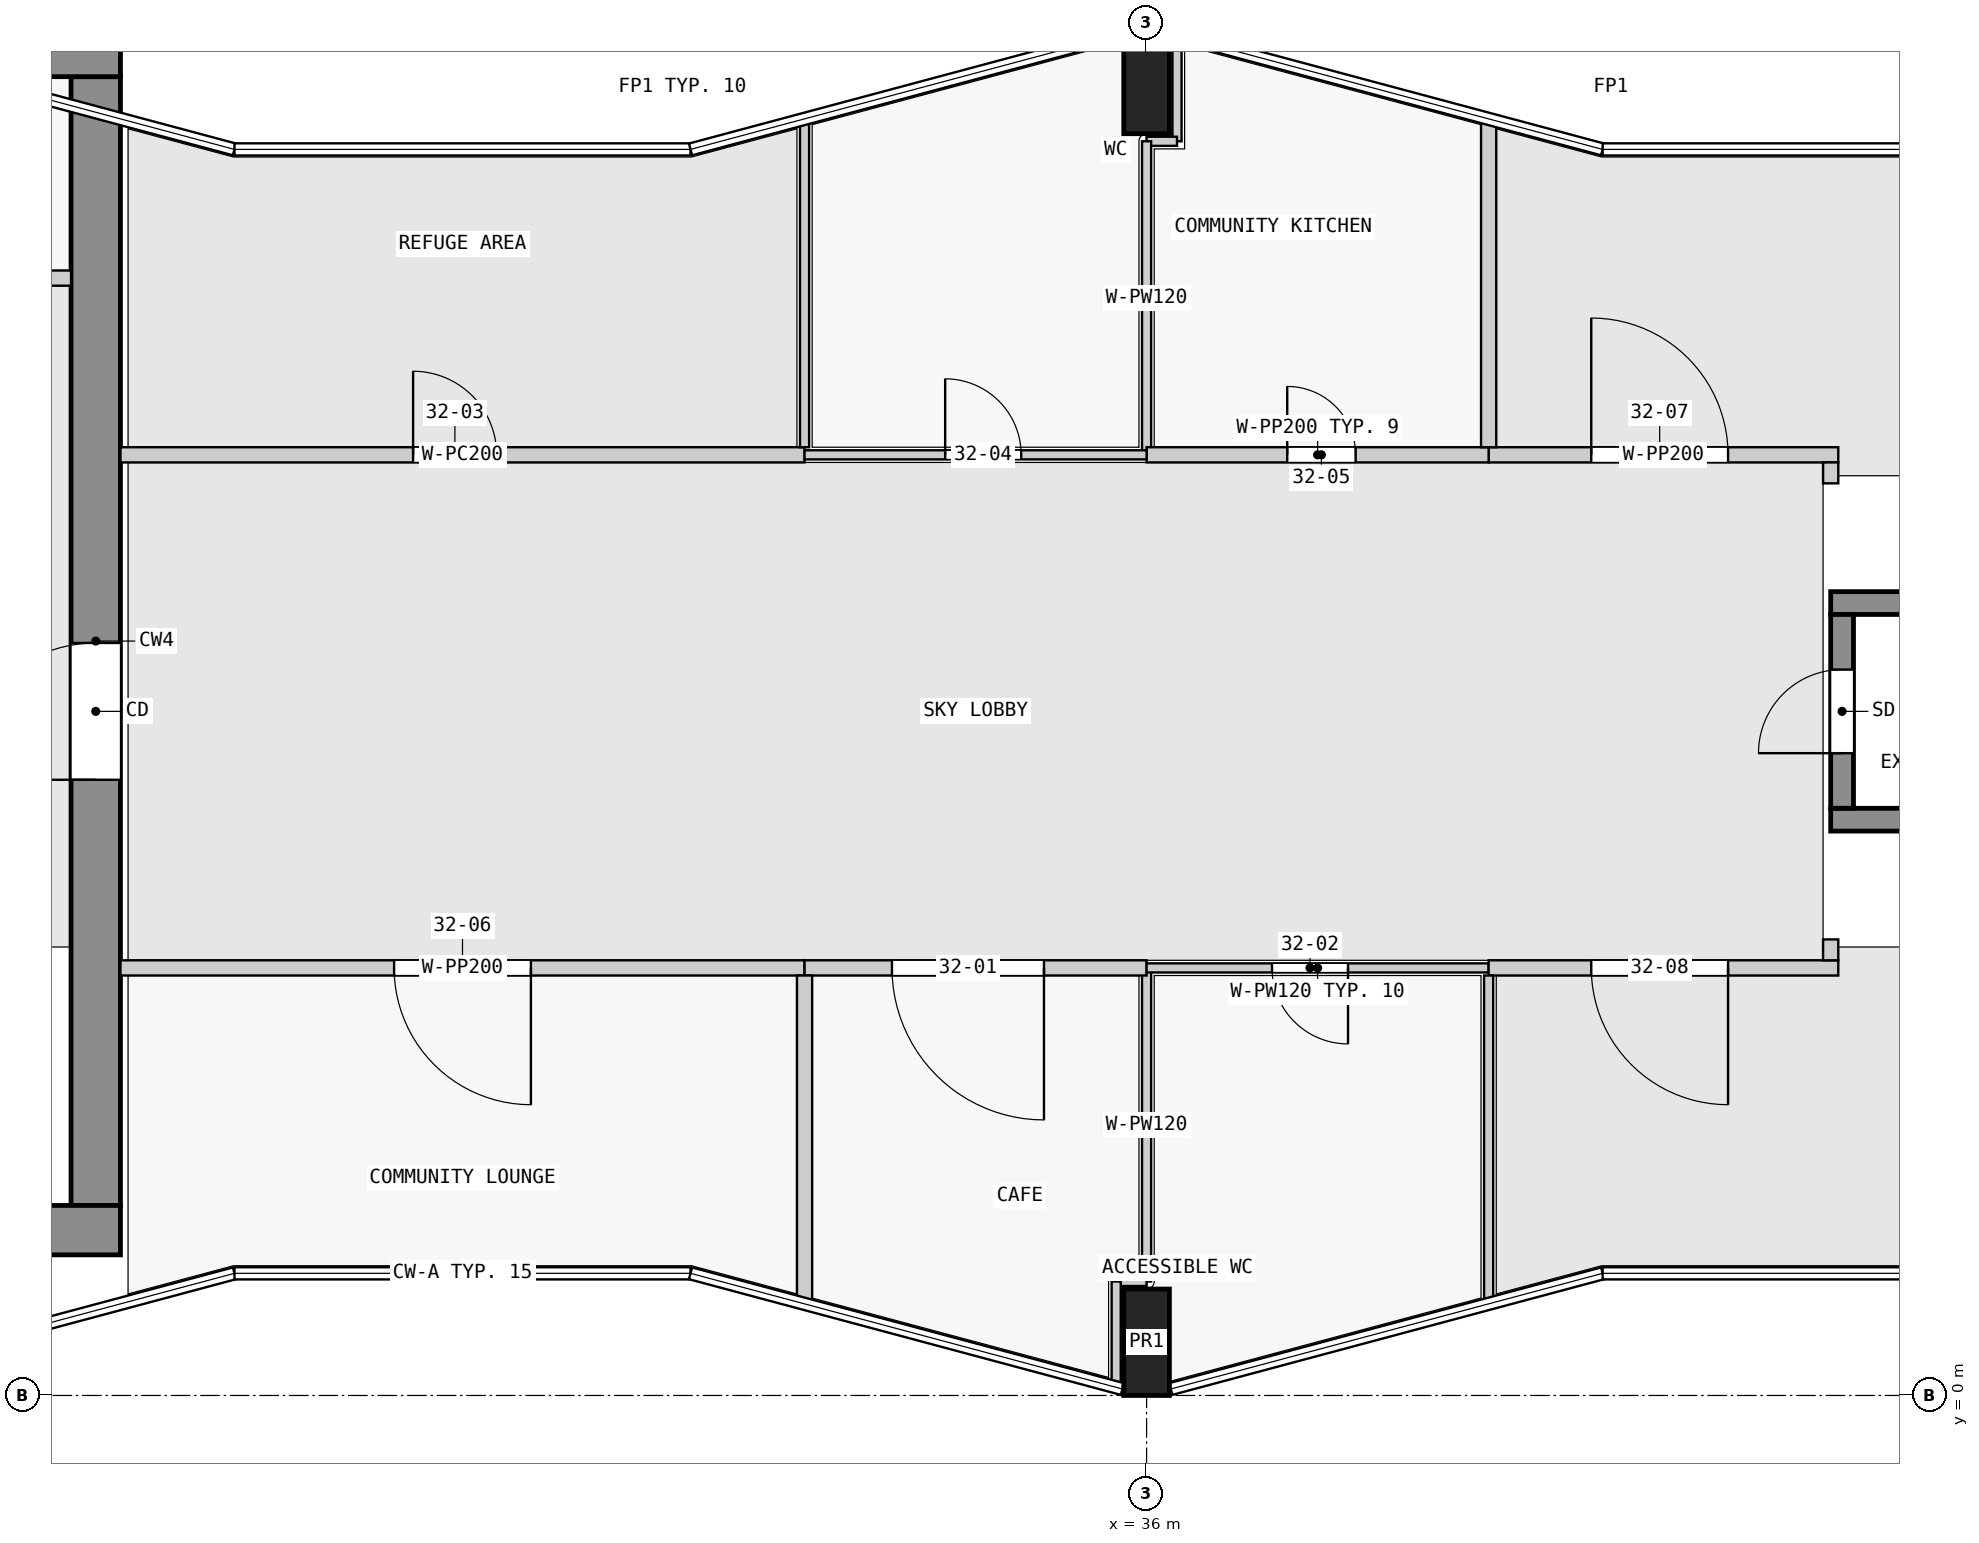
"""IFC4 building model, lengths in metres.
Left out: names, types, materials, properties, quantities, classifications, styles, units other than length and angle.
Written with IfcOpenShell. Run it as: python <this file> out.ifc"""

import sys

from ifc_helpers import new_model, si_unit, direction, frame, frame_2d, origin, origin_2d, place, context, subcontext, project, spatial, rectangle, extrude, element, fill, save


model = new_model("IFC4")
c1 = context("Model", 3, precision=1e-05, world=origin(), true_north=direction((0.0, 1.0)))
c2 = subcontext(c1, "Body", "Model", "MODEL_VIEW")
j1 = project(units=[si_unit("LENGTHUNIT", "METRE"), si_unit("PLANEANGLEUNIT", "RADIAN")], contexts=[c1])
p1 = place(None, origin())
s1 = spatial("IfcSite", under=j1, at=p1, CompositionType="ELEMENT")
p2 = place(p1, origin())
s2 = spatial("IfcBuilding", under=s1, at=p2, CompositionType="ELEMENT")
p3 = place(p2, frame((0.0, 0.0, 123.8)))
s3 = spatial("IfcBuildingStorey", under=s2, at=p3, CompositionType="ELEMENT", Elevation=123.8)
for number, where, z_axis, x_axis in (
    (1, (36.0, 0.7, 0.0), (0.0, 0.0, 1.0), (1.0, 0.0, 0.0)),
    (2, (36.0, 17.3, 0.0), (0.0, 0.0, 1.0), (1.0, 0.0, 0.0)),
):
    element("IfcColumn", number, at=place(p3, frame(where, z_axis=z_axis, x_axis=x_axis)), inside=s3, PredefinedType="COLUMN", context=c2, shape_type="SweptSolid", body=[
        extrude(rectangle(XDim=0.6, YDim=1.4, at=origin_2d()), origin(), (0.0, 0.0, 1.0), 4.8),
    ])
p4 = place(p3, frame((1.65, 2.175, 0.0), z_axis=(0.0, 0.0, 1.0), x_axis=(1.0, 0.0, 0.0)))
e3 = element("IfcWall", 3, at=p4, inside=s3, PredefinedType="SHEAR", context=c2, shape_type="SweptSolid", body=[
    extrude(rectangle(XDim=20.85, YDim=0.65, at=frame_2d((10.425, 0.0))), origin(), (0.0, 0.0, 1.0), 4.5),
])
p5 = place(p3, frame((1.65, 17.675, 0.0), z_axis=(0.0, 0.0, 1.0), x_axis=(1.0, 0.0, 0.0)))
e4 = element("IfcWall", 4, at=p5, inside=s3, PredefinedType="SHEAR", context=c2, shape_type="SweptSolid", body=[
    extrude(rectangle(XDim=20.85, YDim=0.65, at=frame_2d((10.425, 0.0))), origin(), (0.0, 0.0, 1.0), 4.5),
])
p6 = place(p5, frame((6.45, 0.0, 0.0)))
e5 = element("IfcOpeningElement", 5, at=p6, cuts=e4, PredefinedType="OPENING", context=c2, shape_type="SweptSolid", body=[
    extrude(rectangle(XDim=1.8, YDim=2.1, at=frame_2d((0.9, 1.05))), frame((0.0, 0.335, 0.0), z_axis=(0.0, -1.0, 0.0), x_axis=(1.0, 0.0, 0.0)), (0.0, 0.0, 1.0), 0.67),
])
p7 = place(p3, frame((22.175, 2.5, 0.0), z_axis=(0.0, 0.0, 1.0), x_axis=(0.0, 1.0, 0.0)))
e6 = element("IfcWall", 6, at=p7, inside=s3, PredefinedType="SHEAR", context=c2, shape_type="SweptSolid", body=[
    extrude(rectangle(XDim=14.85, YDim=0.65, at=frame_2d((7.425, 0.0))), origin(), (0.0, 0.0, 1.0), 4.5),
])
p8 = place(p7, frame((5.6, 0.0, 0.0)))
e7 = element("IfcOpeningElement", 7, at=p8, cuts=e6, PredefinedType="OPENING", context=c2, shape_type="SweptSolid", body=[
    extrude(rectangle(XDim=1.8, YDim=2.1, at=frame_2d((0.9, 1.05))), frame((0.0, 0.335, 0.0), z_axis=(0.0, -1.0, 0.0), x_axis=(1.0, 0.0, 0.0)), (0.0, 0.0, 1.0), 0.67),
])
p9 = place(p3, frame((45.15, 7.725, 0.0), z_axis=(0.0, 0.0, 1.0), x_axis=(0.0, 1.0, 0.0)))
e8 = element("IfcWall", 8, at=p9, inside=s3, PredefinedType="SHEAR", context=c2, shape_type="SweptSolid", body=[
    extrude(rectangle(XDim=2.55, YDim=0.3, at=frame_2d((1.275, 0.0))), origin(), (0.0, 0.0, 1.0), 4.8),
])
p10 = place(p9, frame((0.725, 0.0, 0.0)))
e9 = element("IfcOpeningElement", 9, at=p10, cuts=e8, PredefinedType="OPENING", context=c2, shape_type="SweptSolid", body=[
    extrude(rectangle(XDim=1.1, YDim=2.1, at=frame_2d((0.55, 1.05))), frame((0.0, 0.16, 0.0), z_axis=(0.0, -1.0, 0.0), x_axis=(1.0, 0.0, 0.0)), (0.0, 0.0, 1.0), 0.32),
])
for number, where, z_axis, x_axis in (
    (10, (45.0, 7.575, 0.0), (0.0, 0.0, 1.0), (1.0, 0.0, 0.0)),
    (11, (45.0, 10.425, 0.0), (0.0, 0.0, 1.0), (1.0, 0.0, 0.0)),
):
    element("IfcWall", number, at=place(p3, frame(where, z_axis=z_axis, x_axis=x_axis)), inside=s3, PredefinedType="SHEAR", context=c2, shape_type="SweptSolid", body=[
        extrude(rectangle(XDim=7.2, YDim=0.3, at=frame_2d((3.6, 0.0))), origin(), (0.0, 0.0, 1.0), 4.8),
    ])
p11 = place(p3, frame((18.6, 14.7, 0.0), z_axis=(0.0, 0.0, 1.0), x_axis=(1.0, 0.0, 0.0)))
e12 = element("IfcWall", 12, at=p11, inside=s3, PredefinedType="PARTITIONING", context=c2, shape_type="SweptSolid", body=[
    extrude(rectangle(XDim=3.25, YDim=0.2, at=frame_2d((1.625, 0.0))), origin(), (0.0, 0.0, 1.0), 4.5),
])
p12 = place(p11, frame((0.3, 0.0, 0.0)))
e13 = element("IfcOpeningElement", 13, at=p12, cuts=e12, PredefinedType="OPENING", context=c2, shape_type="SweptSolid", body=[
    extrude(rectangle(XDim=0.9, YDim=2.1, at=frame_2d((0.45, 1.05))), frame((0.0, 0.11, 0.0), z_axis=(0.0, -1.0, 0.0), x_axis=(1.0, 0.0, 0.0)), (0.0, 0.0, 1.0), 0.22),
])
p13 = place(p11, frame((1.925, 0.0, 0.0)))
e14 = element("IfcOpeningElement", 14, at=p13, cuts=e12, PredefinedType="OPENING", context=c2, shape_type="SweptSolid", body=[
    extrude(rectangle(XDim=0.9, YDim=2.1, at=frame_2d((0.45, 1.05))), frame((0.0, 0.11, 0.0), z_axis=(0.0, -1.0, 0.0), x_axis=(1.0, 0.0, 0.0)), (0.0, 0.0, 1.0), 0.22),
])
p14 = place(p3, frame((22.5, 12.375, 0.0), z_axis=(0.0, 0.0, 1.0), x_axis=(1.0, 0.0, 0.0)))
e15 = element("IfcWall", 15, at=p14, inside=s3, PredefinedType="PARTITIONING", context=c2, shape_type="SweptSolid", body=[
    extrude(rectangle(XDim=9.0, YDim=0.2, at=frame_2d((4.5, 0.0))), origin(), (0.0, 0.0, 1.0), 4.5),
])
p15 = place(p14, frame((3.85, 0.0, 0.0)))
e16 = element("IfcOpeningElement", 16, at=p15, cuts=e15, PredefinedType="OPENING", context=c2, shape_type="SweptSolid", body=[
    extrude(rectangle(XDim=1.1, YDim=2.1, at=frame_2d((0.55, 1.05))), frame((0.0, 0.11, 0.0), z_axis=(0.0, -1.0, 0.0), x_axis=(1.0, 0.0, 0.0)), (0.0, 0.0, 1.0), 0.22),
])
p16 = place(p3, frame((31.5, 5.625, 0.0), z_axis=(0.0, 0.0, 1.0), x_axis=(-1.0, 0.0, 0.0)))
e17 = element("IfcWall", 17, at=p16, inside=s3, PredefinedType="PARTITIONING", context=c2, shape_type="SweptSolid", body=[
    extrude(rectangle(XDim=9.0, YDim=0.2, at=frame_2d((4.5, 0.0))), origin(), (0.0, 0.0, 1.0), 4.5),
])
p17 = place(p16, frame((3.6, 0.0, 0.0)))
e18 = element("IfcOpeningElement", 18, at=p17, cuts=e17, PredefinedType="OPENING", context=c2, shape_type="SweptSolid", body=[
    extrude(rectangle(XDim=1.8, YDim=2.1, at=frame_2d((0.9, 1.05))), frame((0.0, 0.11, 0.0), z_axis=(0.0, -1.0, 0.0), x_axis=(1.0, 0.0, 0.0)), (0.0, 0.0, 1.0), 0.22),
])
p18 = place(p3, frame((36.0, 5.625, 0.0), z_axis=(0.0, 0.0, 1.0), x_axis=(0.0, -1.0, 0.0)))
e19 = element("IfcWall", 19, at=p18, inside=s3, PredefinedType="PARTITIONING", context=c2, shape_type="SweptSolid", body=[
    extrude(rectangle(XDim=4.125, YDim=0.12, at=frame_2d((2.062, 0.0))), origin(), (0.0, 0.0, 1.0), 4.5),
])
p19 = place(p3, frame((36.0, 1.5, 0.0), z_axis=(0.0, 0.0, 1.0), x_axis=(-1.0, 0.0, 0.0)))
e20 = element("IfcWall", 20, at=p19, inside=s3, PredefinedType="PARTITIONING", context=c2, shape_type="SweptSolid", body=[
    extrude(rectangle(XDim=0.4, YDim=0.12, at=frame_2d((0.2, 0.0))), origin(), (0.0, 0.0, 1.0), 4.5),
])
for number, where, z_axis, x_axis in (
    (21, (35.6, 1.5, 0.0), (0.0, 0.0, 1.0), (0.0, -1.0, 0.0)),
    (22, (36.4, 17.893, 0.0), (0.0, 0.0, 1.0), (0.0, -1.0, 0.0)),
):
    element("IfcWall", number, at=place(p3, frame(where, z_axis=z_axis, x_axis=x_axis)), inside=s3, PredefinedType="PARTITIONING", context=c2, shape_type="SweptSolid", body=[
        extrude(rectangle(XDim=1.393, YDim=0.12, at=frame_2d((0.697, 0.0))), origin(), (0.0, 0.0, 1.0), 4.5),
    ])
p20 = place(p3, frame((36.4, 16.5, 0.0), z_axis=(0.0, 0.0, 1.0), x_axis=(-1.0, 0.0, 0.0)))
e23 = element("IfcWall", 23, at=p20, inside=s3, PredefinedType="PARTITIONING", context=c2, shape_type="SweptSolid", body=[
    extrude(rectangle(XDim=0.4, YDim=0.12, at=frame_2d((0.2, 0.0))), origin(), (0.0, 0.0, 1.0), 4.5),
])
p21 = place(p3, frame((36.0, 16.5, 0.0), z_axis=(0.0, 0.0, 1.0), x_axis=(0.0, -1.0, 0.0)))
e24 = element("IfcWall", 24, at=p21, inside=s3, PredefinedType="PARTITIONING", context=c2, shape_type="SweptSolid", body=[
    extrude(rectangle(XDim=4.125, YDim=0.12, at=frame_2d((2.062, 0.0))), origin(), (0.0, 0.0, 1.0), 4.5),
])
p22 = place(p3, frame((40.5, 12.375, 0.0), z_axis=(0.0, 0.0, 1.0), x_axis=(1.0, 0.0, 0.0)))
e25 = element("IfcWall", 25, at=p22, inside=s3, PredefinedType="PARTITIONING", context=c2, shape_type="SweptSolid", body=[
    extrude(rectangle(XDim=4.6, YDim=0.2, at=frame_2d((2.3, 0.0))), origin(), (0.0, 0.0, 1.0), 4.5),
])
p23 = place(p22, frame((1.35, 0.0, 0.0)))
e26 = element("IfcOpeningElement", 26, at=p23, cuts=e25, PredefinedType="OPENING", context=c2, shape_type="SweptSolid", body=[
    extrude(rectangle(XDim=1.8, YDim=2.1, at=frame_2d((0.9, 1.05))), frame((0.0, 0.11, 0.0), z_axis=(0.0, -1.0, 0.0), x_axis=(1.0, 0.0, 0.0)), (0.0, 0.0, 1.0), 0.22),
])
p24 = place(p3, frame((45.0, 12.275, 0.0), z_axis=(0.0, 0.0, 1.0), x_axis=(0.0, -1.0, 0.0)))
e27 = element("IfcWall", 27, at=p24, inside=s3, PredefinedType="PARTITIONING", context=c2, shape_type="SweptSolid", body=[
    extrude(rectangle(XDim=0.275, YDim=0.2, at=frame_2d((0.137, 0.0))), origin(), (0.0, 0.0, 1.0), 4.5),
])
p25 = place(p3, frame((36.0, 12.375, 0.0), z_axis=(0.0, 0.0, 1.0), x_axis=(1.0, 0.0, 0.0)))
e28 = element("IfcWall", 28, at=p25, inside=s3, PredefinedType="PARTITIONING", context=c2, shape_type="SweptSolid", body=[
    extrude(rectangle(XDim=4.5, YDim=0.2, at=frame_2d((2.25, 0.0))), origin(), (0.0, 0.0, 1.0), 4.5),
])
p26 = place(p25, frame((1.85, 0.0, 0.0)))
e29 = element("IfcOpeningElement", 29, at=p26, cuts=e28, PredefinedType="OPENING", context=c2, shape_type="SweptSolid", body=[
    extrude(rectangle(XDim=0.9, YDim=2.1, at=frame_2d((0.45, 1.05))), frame((0.0, 0.11, 0.0), z_axis=(0.0, -1.0, 0.0), x_axis=(1.0, 0.0, 0.0)), (0.0, 0.0, 1.0), 0.22),
])
p27 = place(p3, frame((36.0, 5.625, 0.0), z_axis=(0.0, 0.0, 1.0), x_axis=(-1.0, 0.0, 0.0)))
e30 = element("IfcWall", 30, at=p27, inside=s3, PredefinedType="PARTITIONING", context=c2, shape_type="SweptSolid", body=[
    extrude(rectangle(XDim=4.5, YDim=0.2, at=frame_2d((2.25, 0.0))), origin(), (0.0, 0.0, 1.0), 4.5),
])
p28 = place(p27, frame((1.35, 0.0, 0.0)))
e31 = element("IfcOpeningElement", 31, at=p28, cuts=e30, PredefinedType="OPENING", context=c2, shape_type="SweptSolid", body=[
    extrude(rectangle(XDim=2.0, YDim=2.4, at=frame_2d((1.0, 1.2))), frame((0.0, 0.11, 0.0), z_axis=(0.0, -1.0, 0.0), x_axis=(1.0, 0.0, 0.0)), (0.0, 0.0, 1.0), 0.22),
])
p29 = place(p3, frame((40.5, 5.625, 0.0), z_axis=(0.0, 0.0, 1.0), x_axis=(-1.0, 0.0, 0.0)))
e32 = element("IfcWall", 32, at=p29, inside=s3, PredefinedType="PARTITIONING", context=c2, shape_type="SweptSolid", body=[
    extrude(rectangle(XDim=4.5, YDim=0.12, at=frame_2d((2.25, 0.0))), origin(), (0.0, 0.0, 1.0), 4.5),
])
p30 = place(p29, frame((1.85, 0.0, 0.0)))
e33 = element("IfcOpeningElement", 33, at=p30, cuts=e32, PredefinedType="OPENING", context=c2, shape_type="SweptSolid", body=[
    extrude(rectangle(XDim=1.0, YDim=2.1, at=frame_2d((0.5, 1.05))), frame((0.0, 0.07, 0.0), z_axis=(0.0, -1.0, 0.0), x_axis=(1.0, 0.0, 0.0)), (0.0, 0.0, 1.0), 0.14),
])
p31 = place(p3, frame((31.5, 12.375, 0.0), z_axis=(0.0, 0.0, 1.0), x_axis=(1.0, 0.0, 0.0)))
e34 = element("IfcWall", 34, at=p31, inside=s3, PredefinedType="PARTITIONING", context=c2, shape_type="SweptSolid", body=[
    extrude(rectangle(XDim=4.5, YDim=0.12, at=frame_2d((2.25, 0.0))), origin(), (0.0, 0.0, 1.0), 4.5),
])
p32 = place(p31, frame((1.85, 0.0, 0.0)))
e35 = element("IfcOpeningElement", 35, at=p32, cuts=e34, PredefinedType="OPENING", context=c2, shape_type="SweptSolid", body=[
    extrude(rectangle(XDim=1.0, YDim=2.1, at=frame_2d((0.5, 1.05))), frame((0.0, 0.07, 0.0), z_axis=(0.0, -1.0, 0.0), x_axis=(1.0, 0.0, 0.0)), (0.0, 0.0, 1.0), 0.14),
])
p33 = place(p3, frame((45.1, 5.625, 0.0), z_axis=(0.0, 0.0, 1.0), x_axis=(-1.0, 0.0, 0.0)))
e36 = element("IfcWall", 36, at=p33, inside=s3, PredefinedType="PARTITIONING", context=c2, shape_type="SweptSolid", body=[
    extrude(rectangle(XDim=4.6, YDim=0.2, at=frame_2d((2.3, 0.0))), origin(), (0.0, 0.0, 1.0), 4.5),
])
p34 = place(p33, frame((1.45, 0.0, 0.0)))
e37 = element("IfcOpeningElement", 37, at=p34, cuts=e36, PredefinedType="OPENING", context=c2, shape_type="SweptSolid", body=[
    extrude(rectangle(XDim=1.8, YDim=2.1, at=frame_2d((0.9, 1.05))), frame((0.0, 0.11, 0.0), z_axis=(0.0, -1.0, 0.0), x_axis=(1.0, 0.0, 0.0)), (0.0, 0.0, 1.0), 0.22),
])
p35 = place(p3, frame((40.5, 16.795, 0.0), z_axis=(0.0, 0.0, 1.0), x_axis=(0.0, -1.0, 0.0)))
e38 = element("IfcWall", 38, at=p35, inside=s3, PredefinedType="PARTITIONING", context=c2, shape_type="SweptSolid", body=[
    extrude(rectangle(XDim=4.32, YDim=0.2, at=frame_2d((2.16, 0.0))), origin(), (0.0, 0.0, 1.0), 4.5),
])
for number, where, z_axis, x_axis in (
    (39, (40.5, 5.525, 0.0), (0.0, 0.0, 1.0), (0.0, -1.0, 0.0)),
    (40, (31.5, 16.795, 0.0), (0.0, 0.0, 1.0), (0.0, -1.0, 0.0)),
):
    element("IfcWall", number, at=place(p3, frame(where, z_axis=z_axis, x_axis=x_axis)), inside=s3, PredefinedType="PARTITIONING", context=c2, shape_type="SweptSolid", body=[
        extrude(rectangle(XDim=4.32, YDim=0.12, at=frame_2d((2.16, 0.0))), origin(), (0.0, 0.0, 1.0), 4.5),
    ])
p36 = place(p3, frame((31.5, 5.525, 0.0), z_axis=(0.0, 0.0, 1.0), x_axis=(0.0, -1.0, 0.0)))
e41 = element("IfcWall", 41, at=p36, inside=s3, PredefinedType="PARTITIONING", context=c2, shape_type="SweptSolid", body=[
    extrude(rectangle(XDim=4.32, YDim=0.2, at=frame_2d((2.16, 0.0))), origin(), (0.0, 0.0, 1.0), 4.5),
])
p37 = place(p3, frame((45.0, 6.0, 0.0), z_axis=(0.0, 0.0, 1.0), x_axis=(0.0, -1.0, 0.0)))
e42 = element("IfcWall", 42, at=p37, inside=s3, PredefinedType="PARTITIONING", context=c2, shape_type="SweptSolid", body=[
    extrude(rectangle(XDim=0.275, YDim=0.2, at=frame_2d((0.137, 0.0))), origin(), (0.0, 0.0, 1.0), 4.5),
])
p38 = place(p8, origin())
e43 = element("IfcDoor", 43, at=p38, inside=s3, OperationType="DOUBLE_DOOR_SINGLE_SWING", PredefinedType="DOOR", context=c2, shape_type="SweptSolid", body=[
    extrude(rectangle(XDim=1.8, YDim=2.1, at=frame_2d((0.9, 1.05))), frame((0.0, 0.025, 0.0), z_axis=(0.0, -1.0, 0.0), x_axis=(1.0, 0.0, 0.0)), (0.0, 0.0, 1.0), 0.05),
])
fill(e7, e43)
p39 = place(p10, origin())
e44 = element("IfcDoor", 44, at=p39, inside=s3, OperationType="SINGLE_SWING_LEFT", PredefinedType="DOOR", context=c2, shape_type="SweptSolid", body=[
    extrude(rectangle(XDim=1.1, YDim=2.1, at=frame_2d((0.55, 1.05))), frame((0.0, 0.025, 0.0), z_axis=(0.0, -1.0, 0.0), x_axis=(1.0, 0.0, 0.0)), (0.0, 0.0, 1.0), 0.05),
])
fill(e9, e44)
p40 = place(p28, origin())
e45 = element("IfcDoor", 45, at=p40, inside=s3, OperationType="SINGLE_SWING_LEFT", PredefinedType="DOOR", context=c2, shape_type="SweptSolid", body=[
    extrude(rectangle(XDim=2.0, YDim=2.4, at=frame_2d((1.0, 1.2))), frame((0.0, 0.025, 0.0), z_axis=(0.0, -1.0, 0.0), x_axis=(1.0, 0.0, 0.0)), (0.0, 0.0, 1.0), 0.05),
])
fill(e31, e45)
p41 = place(p30, origin())
e46 = element("IfcDoor", 46, at=p41, inside=s3, OperationType="SINGLE_SWING_LEFT", PredefinedType="DOOR", context=c2, shape_type="SweptSolid", body=[
    extrude(rectangle(XDim=1.0, YDim=2.1, at=frame_2d((0.5, 1.05))), frame((0.0, 0.025, 0.0), z_axis=(0.0, -1.0, 0.0), x_axis=(1.0, 0.0, 0.0)), (0.0, 0.0, 1.0), 0.05),
])
fill(e33, e46)
p42 = place(p15, origin())
e47 = element("IfcDoor", 47, at=p42, inside=s3, OperationType="SINGLE_SWING_LEFT", PredefinedType="DOOR", context=c2, shape_type="SweptSolid", body=[
    extrude(rectangle(XDim=1.1, YDim=2.1, at=frame_2d((0.55, 1.05))), frame((0.0, 0.025, 0.0), z_axis=(0.0, -1.0, 0.0), x_axis=(1.0, 0.0, 0.0)), (0.0, 0.0, 1.0), 0.05),
])
fill(e16, e47)
p43 = place(p32, origin())
e48 = element("IfcDoor", 48, at=p43, inside=s3, OperationType="SINGLE_SWING_LEFT", PredefinedType="DOOR", context=c2, shape_type="SweptSolid", body=[
    extrude(rectangle(XDim=1.0, YDim=2.1, at=frame_2d((0.5, 1.05))), frame((0.0, 0.025, 0.0), z_axis=(0.0, -1.0, 0.0), x_axis=(1.0, 0.0, 0.0)), (0.0, 0.0, 1.0), 0.05),
])
fill(e35, e48)
p44 = place(p26, origin())
e49 = element("IfcDoor", 49, at=p44, inside=s3, OperationType="SINGLE_SWING_LEFT", PredefinedType="DOOR", context=c2, shape_type="SweptSolid", body=[
    extrude(rectangle(XDim=0.9, YDim=2.1, at=frame_2d((0.45, 1.05))), frame((0.0, 0.025, 0.0), z_axis=(0.0, -1.0, 0.0), x_axis=(1.0, 0.0, 0.0)), (0.0, 0.0, 1.0), 0.05),
])
fill(e29, e49)
p45 = place(p17, origin())
e50 = element("IfcDoor", 50, at=p45, inside=s3, OperationType="DOUBLE_DOOR_SINGLE_SWING", PredefinedType="DOOR", context=c2, shape_type="SweptSolid", body=[
    extrude(rectangle(XDim=1.8, YDim=2.1, at=frame_2d((0.9, 1.05))), frame((0.0, 0.025, 0.0), z_axis=(0.0, -1.0, 0.0), x_axis=(1.0, 0.0, 0.0)), (0.0, 0.0, 1.0), 0.05),
])
fill(e18, e50)
p46 = place(p23, origin())
e51 = element("IfcDoor", 51, at=p46, inside=s3, OperationType="DOUBLE_DOOR_SINGLE_SWING", PredefinedType="DOOR", context=c2, shape_type="SweptSolid", body=[
    extrude(rectangle(XDim=1.8, YDim=2.1, at=frame_2d((0.9, 1.05))), frame((0.0, 0.025, 0.0), z_axis=(0.0, -1.0, 0.0), x_axis=(1.0, 0.0, 0.0)), (0.0, 0.0, 1.0), 0.05),
])
fill(e26, e51)
p47 = place(p34, origin())
e52 = element("IfcDoor", 52, at=p47, inside=s3, OperationType="DOUBLE_DOOR_SINGLE_SWING", PredefinedType="DOOR", context=c2, shape_type="SweptSolid", body=[
    extrude(rectangle(XDim=1.8, YDim=2.1, at=frame_2d((0.9, 1.05))), frame((0.0, 0.025, 0.0), z_axis=(0.0, -1.0, 0.0), x_axis=(1.0, 0.0, 0.0)), (0.0, 0.0, 1.0), 0.05),
])
fill(e37, e52)
save(model, sys.argv[1])
